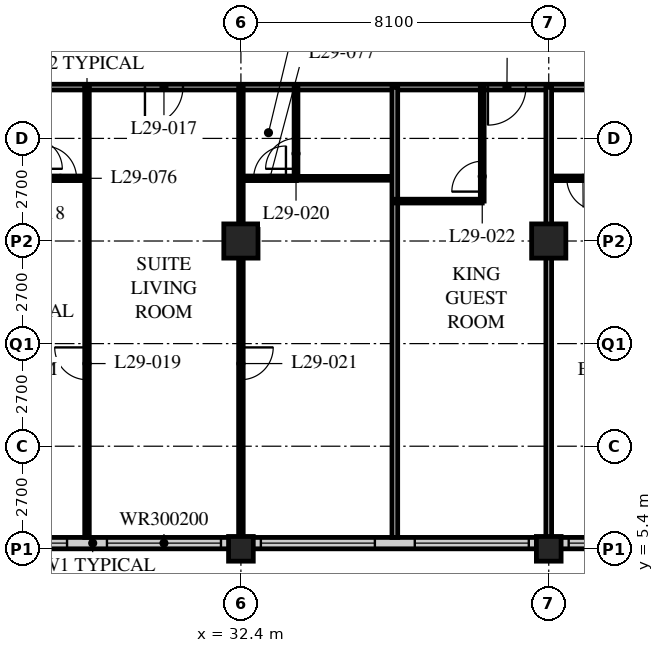
"""IFC4 building model, lengths in metres.
Left out: names, types, materials, properties, quantities, classifications, styles, units other than length and angle.
Written with IfcOpenShell. Run it as: python <this file> out.ifc"""

import sys

from ifc_helpers import new_model, si_unit, direction, frame, frame_2d, origin, origin_2d, place, context, subcontext, project, spatial, rectangle, hollow_rectangle, extrude, element, fill, save


model = new_model("IFC4")
c1 = context("Model", 3, precision=1e-05, world=origin(), true_north=direction((0.0, 1.0)))
c2 = subcontext(c1, "Body", "Model", "MODEL_VIEW")
j1 = project(units=[si_unit("LENGTHUNIT", "METRE"), si_unit("PLANEANGLEUNIT", "RADIAN")], contexts=[c1])
p1 = place(None, origin())
s1 = spatial("IfcSite", under=j1, at=p1, CompositionType="ELEMENT")
p2 = place(p1, origin())
s2 = spatial("IfcBuilding", under=s1, at=p2, CompositionType="ELEMENT")
p3 = place(p2, frame((0.0, 0.0, 117.0)))
s3 = spatial("IfcBuildingStorey", under=s2, at=p3, CompositionType="ELEMENT", Elevation=117.0)
p4 = place(p3, frame((32.4, 5.4, 0.0), z_axis=(0.0, 0.0, 1.0), x_axis=(1.0, 0.0, 0.0)))
e1 = element("IfcColumn", 1, at=p4, inside=s3, PredefinedType="COLUMN", context=c2, shape_type="SweptSolid", body=[
    extrude(hollow_rectangle(XDim=0.65, YDim=0.65, WallThickness=0.055, at=origin_2d()), origin(), (0.0, 0.0, 1.0), 3.4),
])
p5 = place(p3, frame((32.4, 13.5, 0.0), z_axis=(0.0, 0.0, 1.0), x_axis=(1.0, 0.0, 0.0)))
e2 = element("IfcColumn", 2, at=p5, inside=s3, PredefinedType="COLUMN", context=c2, shape_type="SweptSolid", body=[
    extrude(hollow_rectangle(XDim=0.9, YDim=0.9, WallThickness=0.09, at=origin_2d()), origin(), (0.0, 0.0, 1.0), 3.4),
])
p6 = place(p3, frame((40.5, 5.4, 0.0), z_axis=(0.0, 0.0, 1.0), x_axis=(1.0, 0.0, 0.0)))
e3 = element("IfcColumn", 3, at=p6, inside=s3, PredefinedType="COLUMN", context=c2, shape_type="SweptSolid", body=[
    extrude(hollow_rectangle(XDim=0.65, YDim=0.65, WallThickness=0.055, at=origin_2d()), origin(), (0.0, 0.0, 1.0), 3.4),
])
p7 = place(p3, frame((40.5, 13.5, 0.0), z_axis=(0.0, 0.0, 1.0), x_axis=(1.0, 0.0, 0.0)))
e4 = element("IfcColumn", 4, at=p7, inside=s3, PredefinedType="COLUMN", context=c2, shape_type="SweptSolid", body=[
    extrude(hollow_rectangle(XDim=0.9, YDim=0.9, WallThickness=0.09, at=origin_2d()), origin(), (0.0, 0.0, 1.0), 3.4),
])
p8 = place(p3, frame((8.4, 5.55, 0.0), z_axis=(0.0, 0.0, 1.0), x_axis=(1.0, 0.0, 0.0)))
e5 = element("IfcWall", 5, at=p8, inside=s3, PredefinedType="SOLIDWALL", context=c2, shape_type="SweptSolid", body=[
    extrude(rectangle(XDim=40.2, YDim=0.3, at=frame_2d((20.1, 0.0))), origin(), (0.0, 0.0, 1.0), 3.19),
])
p9 = place(p8, frame((0.225, 0.0, 0.9)))
e6 = element("IfcOpeningElement", 6, at=p9, cuts=e5, PredefinedType="OPENING", context=c2, shape_type="SweptSolid", body=[
    extrude(rectangle(XDim=3.0, YDim=2.0, at=frame_2d((1.5, 1.0))), frame((0.0, 0.16, 0.0), z_axis=(0.0, -1.0, 0.0), x_axis=(1.0, 0.0, 0.0)), (0.0, 0.0, 1.0), 0.32),
])
p10 = place(p8, frame((4.275, 0.0, 0.9)))
e7 = element("IfcOpeningElement", 7, at=p10, cuts=e5, PredefinedType="OPENING", context=c2, shape_type="SweptSolid", body=[
    extrude(rectangle(XDim=3.0, YDim=2.0, at=frame_2d((1.5, 1.0))), frame((0.0, 0.16, 0.0), z_axis=(0.0, -1.0, 0.0), x_axis=(1.0, 0.0, 0.0)), (0.0, 0.0, 1.0), 0.32),
])
p11 = place(p8, frame((8.325, 0.0, 0.9)))
e8 = element("IfcOpeningElement", 8, at=p11, cuts=e5, PredefinedType="OPENING", context=c2, shape_type="SweptSolid", body=[
    extrude(rectangle(XDim=3.0, YDim=2.0, at=frame_2d((1.5, 1.0))), frame((0.0, 0.16, 0.0), z_axis=(0.0, -1.0, 0.0), x_axis=(1.0, 0.0, 0.0)), (0.0, 0.0, 1.0), 0.32),
])
p12 = place(p8, frame((12.375, 0.0, 0.9)))
e9 = element("IfcOpeningElement", 9, at=p12, cuts=e5, PredefinedType="OPENING", context=c2, shape_type="SweptSolid", body=[
    extrude(rectangle(XDim=3.0, YDim=2.0, at=frame_2d((1.5, 1.0))), frame((0.0, 0.16, 0.0), z_axis=(0.0, -1.0, 0.0), x_axis=(1.0, 0.0, 0.0)), (0.0, 0.0, 1.0), 0.32),
])
p13 = place(p8, frame((16.425, 0.0, 0.9)))
e10 = element("IfcOpeningElement", 10, at=p13, cuts=e5, PredefinedType="OPENING", context=c2, shape_type="SweptSolid", body=[
    extrude(rectangle(XDim=3.0, YDim=2.0, at=frame_2d((1.5, 1.0))), frame((0.0, 0.16, 0.0), z_axis=(0.0, -1.0, 0.0), x_axis=(1.0, 0.0, 0.0)), (0.0, 0.0, 1.0), 0.32),
])
p14 = place(p8, frame((20.475, 0.0, 0.9)))
e11 = element("IfcOpeningElement", 11, at=p14, cuts=e5, PredefinedType="OPENING", context=c2, shape_type="SweptSolid", body=[
    extrude(rectangle(XDim=3.0, YDim=2.0, at=frame_2d((1.5, 1.0))), frame((0.0, 0.16, 0.0), z_axis=(0.0, -1.0, 0.0), x_axis=(1.0, 0.0, 0.0)), (0.0, 0.0, 1.0), 0.32),
])
p15 = place(p8, frame((24.525, 0.0, 0.9)))
e12 = element("IfcOpeningElement", 12, at=p15, cuts=e5, PredefinedType="OPENING", context=c2, shape_type="SweptSolid", body=[
    extrude(rectangle(XDim=3.0, YDim=2.0, at=frame_2d((1.5, 1.0))), frame((0.0, 0.16, 0.0), z_axis=(0.0, -1.0, 0.0), x_axis=(1.0, 0.0, 0.0)), (0.0, 0.0, 1.0), 0.32),
])
p16 = place(p8, frame((28.575, 0.0, 0.9)))
e13 = element("IfcOpeningElement", 13, at=p16, cuts=e5, PredefinedType="OPENING", context=c2, shape_type="SweptSolid", body=[
    extrude(rectangle(XDim=3.0, YDim=2.0, at=frame_2d((1.5, 1.0))), frame((0.0, 0.16, 0.0), z_axis=(0.0, -1.0, 0.0), x_axis=(1.0, 0.0, 0.0)), (0.0, 0.0, 1.0), 0.32),
])
p17 = place(p8, frame((32.625, 0.0, 0.9)))
e14 = element("IfcOpeningElement", 14, at=p17, cuts=e5, PredefinedType="OPENING", context=c2, shape_type="SweptSolid", body=[
    extrude(rectangle(XDim=3.0, YDim=2.0, at=frame_2d((1.5, 1.0))), frame((0.0, 0.16, 0.0), z_axis=(0.0, -1.0, 0.0), x_axis=(1.0, 0.0, 0.0)), (0.0, 0.0, 1.0), 0.32),
])
p18 = place(p8, frame((36.675, 0.0, 0.9)))
e15 = element("IfcOpeningElement", 15, at=p18, cuts=e5, PredefinedType="OPENING", context=c2, shape_type="SweptSolid", body=[
    extrude(rectangle(XDim=3.0, YDim=2.0, at=frame_2d((1.5, 1.0))), frame((0.0, 0.16, 0.0), z_axis=(0.0, -1.0, 0.0), x_axis=(1.0, 0.0, 0.0)), (0.0, 0.0, 1.0), 0.32),
])
p19 = place(p3, frame((12.15, 17.55, 0.0), z_axis=(0.0, 0.0, 1.0), x_axis=(1.0, 0.0, 0.0)))
e16 = element("IfcWall", 16, at=p19, inside=s3, PredefinedType="PARTITIONING", context=c2, shape_type="SweptSolid", body=[
    extrude(rectangle(XDim=32.4, YDim=0.15, at=frame_2d((16.2, 0.0))), origin(), (0.0, 0.0, 1.0), 3.19),
])
p20 = place(p19, frame((5.95, 0.0, 0.0)))
e17 = element("IfcOpeningElement", 17, at=p20, cuts=e16, PredefinedType="OPENING", context=c2, shape_type="SweptSolid", body=[
    extrude(rectangle(XDim=1.0, YDim=2.1, at=frame_2d((0.5, 1.05))), frame((0.0, 0.085, 0.0), z_axis=(0.0, -1.0, 0.0), x_axis=(1.0, 0.0, 0.0)), (0.0, 0.0, 1.0), 0.17),
])
p21 = place(p19, frame((17.725, 0.0, 0.0)))
e18 = element("IfcOpeningElement", 18, at=p21, cuts=e16, PredefinedType="OPENING", context=c2, shape_type="SweptSolid", body=[
    extrude(rectangle(XDim=1.0, YDim=2.1, at=frame_2d((0.5, 1.05))), frame((0.0, 0.085, 0.0), z_axis=(0.0, -1.0, 0.0), x_axis=(1.0, 0.0, 0.0)), (0.0, 0.0, 1.0), 0.17),
])
p22 = place(p19, frame((26.75, 0.0, 0.0)))
e19 = element("IfcOpeningElement", 19, at=p22, cuts=e16, PredefinedType="OPENING", context=c2, shape_type="SweptSolid", body=[
    extrude(rectangle(XDim=1.0, YDim=2.1, at=frame_2d((0.5, 1.05))), frame((0.0, 0.085, 0.0), z_axis=(0.0, -1.0, 0.0), x_axis=(1.0, 0.0, 0.0)), (0.0, 0.0, 1.0), 0.17),
])
p23 = place(p19, frame((1.525, 0.0, 0.0)))
e20 = element("IfcOpeningElement", 20, at=p23, cuts=e16, PredefinedType="OPENING", context=c2, shape_type="SweptSolid", body=[
    extrude(rectangle(XDim=1.0, YDim=2.1, at=frame_2d((0.5, 1.05))), frame((0.0, 0.085, 0.0), z_axis=(0.0, -1.0, 0.0), x_axis=(1.0, 0.0, 0.0)), (0.0, 0.0, 1.0), 0.17),
])
p24 = place(p19, frame((29.875, 0.0, 0.0)))
e21 = element("IfcOpeningElement", 21, at=p24, cuts=e16, PredefinedType="OPENING", context=c2, shape_type="SweptSolid", body=[
    extrude(rectangle(XDim=1.0, YDim=2.1, at=frame_2d((0.5, 1.05))), frame((0.0, 0.085, 0.0), z_axis=(0.0, -1.0, 0.0), x_axis=(1.0, 0.0, 0.0)), (0.0, 0.0, 1.0), 0.17),
])
p25 = place(p3, frame((28.35, 17.55, 0.0), z_axis=(0.0, 0.0, 1.0), x_axis=(0.0, -1.0, 0.0)))
e22 = element("IfcWall", 22, at=p25, inside=s3, PredefinedType="PARTITIONING", context=c2, shape_type="SweptSolid", body=[
    extrude(rectangle(XDim=11.85, YDim=0.12, at=frame_2d((5.925, 0.0))), origin(), (0.0, 0.0, 1.0), 3.19),
])
p26 = place(p25, frame((6.85, 0.0, 0.0)))
e23 = element("IfcOpeningElement", 23, at=p26, cuts=e22, PredefinedType="OPENING", context=c2, shape_type="SweptSolid", body=[
    extrude(rectangle(XDim=0.85, YDim=2.1, at=frame_2d((0.425, 1.05))), frame((0.0, 0.07, 0.0), z_axis=(0.0, -1.0, 0.0), x_axis=(1.0, 0.0, 0.0)), (0.0, 0.0, 1.0), 0.14),
])
p27 = place(p3, frame((33.85, 15.15, 0.0), z_axis=(0.0, 0.0, 1.0), x_axis=(1.0, 0.0, 0.0)))
e24 = element("IfcWall", 24, at=p27, inside=s3, PredefinedType="PARTITIONING", context=c2, shape_type="SweptSolid", body=[
    extrude(rectangle(XDim=2.6, YDim=0.1, at=frame_2d((1.3, 0.0))), origin(), (0.0, 0.0, 1.0), 3.19),
])
p28 = place(p3, frame((33.85, 17.55, 0.0), z_axis=(0.0, 0.0, 1.0), x_axis=(0.0, -1.0, 0.0)))
e25 = element("IfcWall", 25, at=p28, inside=s3, PredefinedType="PARTITIONING", context=c2, shape_type="SweptSolid", body=[
    extrude(rectangle(XDim=2.4, YDim=0.1, at=frame_2d((1.2, 0.0))), origin(), (0.0, 0.0, 1.0), 3.19),
])
p29 = place(p28, frame((1.35, 0.0, 0.0)))
e26 = element("IfcOpeningElement", 26, at=p29, cuts=e25, PredefinedType="OPENING", context=c2, shape_type="SweptSolid", body=[
    extrude(rectangle(XDim=0.8, YDim=2.1, at=frame_2d((0.4, 1.05))), frame((0.0, 0.06, 0.0), z_axis=(0.0, -1.0, 0.0), x_axis=(1.0, 0.0, 0.0)), (0.0, 0.0, 1.0), 0.12),
])
p30 = place(p3, frame((32.4, 17.55, 0.0), z_axis=(0.0, 0.0, 1.0), x_axis=(0.0, -1.0, 0.0)))
e27 = element("IfcWall", 27, at=p30, inside=s3, PredefinedType="PARTITIONING", context=c2, shape_type="SweptSolid", body=[
    extrude(rectangle(XDim=11.85, YDim=0.12, at=frame_2d((5.925, 0.0))), origin(), (0.0, 0.0, 1.0), 2.578),
])
p31 = place(p30, frame((6.85, 0.0, 0.0)))
e28 = element("IfcOpeningElement", 28, at=p31, cuts=e27, PredefinedType="OPENING", context=c2, shape_type="SweptSolid", body=[
    extrude(rectangle(XDim=0.85, YDim=2.1, at=frame_2d((0.425, 1.05))), frame((0.0, 0.07, 0.0), z_axis=(0.0, -1.0, 0.0), x_axis=(1.0, 0.0, 0.0)), (0.0, 0.0, 1.0), 0.14),
])
p32 = place(p3, frame((36.45, 17.55, 0.0), z_axis=(0.0, 0.0, 1.0), x_axis=(0.0, -1.0, 0.0)))
e29 = element("IfcWall", 29, at=p32, inside=s3, PredefinedType="PARTITIONING", context=c2, shape_type="SweptSolid", body=[
    extrude(rectangle(XDim=11.85, YDim=0.15, at=frame_2d((5.925, 0.0))), origin(), (0.0, 0.0, 1.0), 3.19),
])
p33 = place(p3, frame((36.45, 14.55, 0.0), z_axis=(0.0, 0.0, 1.0), x_axis=(1.0, 0.0, 0.0)))
e30 = element("IfcWall", 30, at=p33, inside=s3, PredefinedType="PARTITIONING", context=c2, shape_type="SweptSolid", body=[
    extrude(rectangle(XDim=2.3, YDim=0.1, at=frame_2d((1.15, 0.0))), origin(), (0.0, 0.0, 1.0), 3.19),
])
p34 = place(p3, frame((38.75, 17.55, 0.0), z_axis=(0.0, 0.0, 1.0), x_axis=(0.0, -1.0, 0.0)))
e31 = element("IfcWall", 31, at=p34, inside=s3, PredefinedType="PARTITIONING", context=c2, shape_type="SweptSolid", body=[
    extrude(rectangle(XDim=3.0, YDim=0.1, at=frame_2d((1.5, 0.0))), origin(), (0.0, 0.0, 1.0), 3.19),
])
p35 = place(p34, frame((1.95, 0.0, 0.0)))
e32 = element("IfcOpeningElement", 32, at=p35, cuts=e31, PredefinedType="OPENING", context=c2, shape_type="SweptSolid", body=[
    extrude(rectangle(XDim=0.8, YDim=2.1, at=frame_2d((0.4, 1.05))), frame((0.0, 0.06, 0.0), z_axis=(0.0, -1.0, 0.0), x_axis=(1.0, 0.0, 0.0)), (0.0, 0.0, 1.0), 0.12),
])
p36 = place(p3, frame((40.5, 15.15, 0.0), z_axis=(0.0, 0.0, 1.0), x_axis=(1.0, 0.0, 0.0)))
e33 = element("IfcWall", 33, at=p36, inside=s3, PredefinedType="PARTITIONING", context=c2, shape_type="SweptSolid", body=[
    extrude(rectangle(XDim=8.05, YDim=0.12, at=frame_2d((4.025, 0.0))), origin(), (0.0, 0.0, 1.0), 3.19),
])
p37 = place(p36, frame((0.475, 0.0, 0.0)))
e34 = element("IfcOpeningElement", 34, at=p37, cuts=e33, PredefinedType="OPENING", context=c2, shape_type="SweptSolid", body=[
    extrude(rectangle(XDim=0.85, YDim=2.1, at=frame_2d((0.425, 1.05))), frame((0.0, 0.07, 0.0), z_axis=(0.0, -1.0, 0.0), x_axis=(1.0, 0.0, 0.0)), (0.0, 0.0, 1.0), 0.14),
])
p38 = place(p36, frame((4.325, 0.0, 0.0)))
e35 = element("IfcOpeningElement", 35, at=p38, cuts=e33, PredefinedType="OPENING", context=c2, shape_type="SweptSolid", body=[
    extrude(rectangle(XDim=0.85, YDim=2.1, at=frame_2d((0.425, 1.05))), frame((0.0, 0.07, 0.0), z_axis=(0.0, -1.0, 0.0), x_axis=(1.0, 0.0, 0.0)), (0.0, 0.0, 1.0), 0.14),
])
p39 = place(p3, frame((40.5, 17.55, 0.0), z_axis=(0.0, 0.0, 1.0), x_axis=(0.0, -1.0, 0.0)))
e36 = element("IfcWall", 36, at=p39, inside=s3, PredefinedType="PARTITIONING", context=c2, shape_type="SweptSolid", body=[
    extrude(rectangle(XDim=11.85, YDim=0.15, at=frame_2d((5.925, 0.0))), origin(), (0.0, 0.0, 1.0), 2.578),
])
p40 = place(p3, frame((28.35, 15.15, 0.0), z_axis=(0.0, 0.0, 1.0), x_axis=(-1.0, 0.0, 0.0)))
e37 = element("IfcWall", 37, at=p40, inside=s3, PredefinedType="PARTITIONING", context=c2, shape_type="SweptSolid", body=[
    extrude(rectangle(XDim=1.46, YDim=0.12, at=frame_2d((0.73, 0.0))), origin(), (0.0, 0.0, 1.0), 3.19),
])
p41 = place(p40, frame((0.275, 0.0, 0.0)))
e38 = element("IfcOpeningElement", 38, at=p41, cuts=e37, PredefinedType="OPENING", context=c2, shape_type="SweptSolid", body=[
    extrude(rectangle(XDim=0.85, YDim=2.1, at=frame_2d((0.425, 1.05))), frame((0.0, 0.07, 0.0), z_axis=(0.0, -1.0, 0.0), x_axis=(1.0, 0.0, 0.0)), (0.0, 0.0, 1.0), 0.14),
])
p42 = place(p3, frame((33.86, 15.15, 0.0), z_axis=(0.0, 0.0, 1.0), x_axis=(-1.0, 0.0, 0.0)))
e39 = element("IfcWall", 39, at=p42, inside=s3, PredefinedType="PARTITIONING", context=c2, shape_type="SweptSolid", body=[
    extrude(rectangle(XDim=1.46, YDim=0.12, at=frame_2d((0.73, 0.0))), origin(), (0.0, 0.0, 1.0), 3.19),
])
p43 = place(p42, frame((0.275, 0.0, 0.0)))
e40 = element("IfcOpeningElement", 40, at=p43, cuts=e39, PredefinedType="OPENING", context=c2, shape_type="SweptSolid", body=[
    extrude(rectangle(XDim=0.85, YDim=2.1, at=frame_2d((0.425, 1.05))), frame((0.0, 0.07, 0.0), z_axis=(0.0, -1.0, 0.0), x_axis=(1.0, 0.0, 0.0)), (0.0, 0.0, 1.0), 0.14),
])
p44 = place(p13, origin())
e41 = element("IfcWindow", 41, at=p44, inside=s3, PartitioningType="SINGLE_PANEL", PredefinedType="WINDOW", context=c2, shape_type="SweptSolid", body=[
    extrude(rectangle(XDim=3.0, YDim=2.0, at=frame_2d((1.5, 1.0))), frame((0.0, 0.03, 0.0), z_axis=(0.0, -1.0, 0.0), x_axis=(1.0, 0.0, 0.0)), (0.0, 0.0, 1.0), 0.06),
])
fill(e10, e41)
p45 = place(p14, origin())
e42 = element("IfcWindow", 42, at=p45, inside=s3, PartitioningType="SINGLE_PANEL", PredefinedType="WINDOW", context=c2, shape_type="SweptSolid", body=[
    extrude(rectangle(XDim=3.0, YDim=2.0, at=frame_2d((1.5, 1.0))), frame((0.0, 0.03, 0.0), z_axis=(0.0, -1.0, 0.0), x_axis=(1.0, 0.0, 0.0)), (0.0, 0.0, 1.0), 0.06),
])
fill(e11, e42)
p46 = place(p15, origin())
e43 = element("IfcWindow", 43, at=p46, inside=s3, PartitioningType="SINGLE_PANEL", PredefinedType="WINDOW", context=c2, shape_type="SweptSolid", body=[
    extrude(rectangle(XDim=3.0, YDim=2.0, at=frame_2d((1.5, 1.0))), frame((0.0, 0.03, 0.0), z_axis=(0.0, -1.0, 0.0), x_axis=(1.0, 0.0, 0.0)), (0.0, 0.0, 1.0), 0.06),
])
fill(e12, e43)
p47 = place(p16, origin())
e44 = element("IfcWindow", 44, at=p47, inside=s3, PartitioningType="SINGLE_PANEL", PredefinedType="WINDOW", context=c2, shape_type="SweptSolid", body=[
    extrude(rectangle(XDim=3.0, YDim=2.0, at=frame_2d((1.5, 1.0))), frame((0.0, 0.03, 0.0), z_axis=(0.0, -1.0, 0.0), x_axis=(1.0, 0.0, 0.0)), (0.0, 0.0, 1.0), 0.06),
])
fill(e13, e44)
p48 = place(p17, origin())
e45 = element("IfcWindow", 45, at=p48, inside=s3, PartitioningType="SINGLE_PANEL", PredefinedType="WINDOW", context=c2, shape_type="SweptSolid", body=[
    extrude(rectangle(XDim=3.0, YDim=2.0, at=frame_2d((1.5, 1.0))), frame((0.0, 0.03, 0.0), z_axis=(0.0, -1.0, 0.0), x_axis=(1.0, 0.0, 0.0)), (0.0, 0.0, 1.0), 0.06),
])
fill(e14, e45)
p49 = place(p21, origin())
e46 = element("IfcDoor", 46, at=p49, inside=s3, OperationType="SINGLE_SWING_RIGHT", PredefinedType="DOOR", context=c2, shape_type="SweptSolid", body=[
    extrude(rectangle(XDim=1.0, YDim=2.1, at=frame_2d((0.5, 1.05))), frame((0.0, 0.025, 0.0), z_axis=(0.0, -1.0, 0.0), x_axis=(1.0, 0.0, 0.0)), (0.0, 0.0, 1.0), 0.05),
])
fill(e18, e46)
p50 = place(p26, origin())
e47 = element("IfcDoor", 47, at=p50, inside=s3, OperationType="SINGLE_SWING_RIGHT", PredefinedType="DOOR", context=c2, shape_type="SweptSolid", body=[
    extrude(rectangle(XDim=0.85, YDim=2.1, at=frame_2d((0.425, 1.05))), frame((0.0, 0.025, 0.0), z_axis=(0.0, -1.0, 0.0), x_axis=(1.0, 0.0, 0.0)), (0.0, 0.0, 1.0), 0.05),
])
fill(e23, e47)
p51 = place(p29, origin())
e48 = element("IfcDoor", 48, at=p51, inside=s3, OperationType="SINGLE_SWING_LEFT", PredefinedType="DOOR", context=c2, shape_type="SweptSolid", body=[
    extrude(rectangle(XDim=0.8, YDim=2.1, at=frame_2d((0.4, 1.05))), frame((0.0, 0.025, 0.0), z_axis=(0.0, -1.0, 0.0), x_axis=(1.0, 0.0, 0.0)), (0.0, 0.0, 1.0), 0.05),
])
fill(e26, e48)
p52 = place(p31, origin())
e49 = element("IfcDoor", 49, at=p52, inside=s3, OperationType="SINGLE_SWING_LEFT", PredefinedType="DOOR", context=c2, shape_type="SweptSolid", body=[
    extrude(rectangle(XDim=0.85, YDim=2.1, at=frame_2d((0.425, 1.05))), frame((0.0, 0.025, 0.0), z_axis=(0.0, -1.0, 0.0), x_axis=(1.0, 0.0, 0.0)), (0.0, 0.0, 1.0), 0.05),
])
fill(e28, e49)
p53 = place(p35, origin())
e50 = element("IfcDoor", 50, at=p53, inside=s3, OperationType="SINGLE_SWING_LEFT", PredefinedType="DOOR", context=c2, shape_type="SweptSolid", body=[
    extrude(rectangle(XDim=0.8, YDim=2.1, at=frame_2d((0.4, 1.05))), frame((0.0, 0.025, 0.0), z_axis=(0.0, -1.0, 0.0), x_axis=(1.0, 0.0, 0.0)), (0.0, 0.0, 1.0), 0.05),
])
fill(e32, e50)
p54 = place(p22, origin())
e51 = element("IfcDoor", 51, at=p54, inside=s3, OperationType="SINGLE_SWING_RIGHT", PredefinedType="DOOR", context=c2, shape_type="SweptSolid", body=[
    extrude(rectangle(XDim=1.0, YDim=2.1, at=frame_2d((0.5, 1.05))), frame((0.0, 0.025, 0.0), z_axis=(0.0, -1.0, 0.0), x_axis=(1.0, 0.0, 0.0)), (0.0, 0.0, 1.0), 0.05),
])
fill(e19, e51)
p55 = place(p37, origin())
e52 = element("IfcDoor", 52, at=p55, inside=s3, OperationType="SINGLE_SWING_LEFT", PredefinedType="DOOR", context=c2, shape_type="SweptSolid", body=[
    extrude(rectangle(XDim=0.85, YDim=2.1, at=frame_2d((0.425, 1.05))), frame((0.0, 0.025, 0.0), z_axis=(0.0, -1.0, 0.0), x_axis=(1.0, 0.0, 0.0)), (0.0, 0.0, 1.0), 0.05),
])
fill(e34, e52)
p56 = place(p41, origin())
e53 = element("IfcDoor", 53, at=p56, inside=s3, OperationType="SINGLE_SWING_LEFT", PredefinedType="DOOR", context=c2, shape_type="SweptSolid", body=[
    extrude(rectangle(XDim=0.85, YDim=2.1, at=frame_2d((0.425, 1.05))), frame((0.0, 0.025, 0.0), z_axis=(0.0, -1.0, 0.0), x_axis=(1.0, 0.0, 0.0)), (0.0, 0.0, 1.0), 0.05),
])
fill(e38, e53)
p57 = place(p43, origin())
e54 = element("IfcDoor", 54, at=p57, inside=s3, OperationType="SINGLE_SWING_RIGHT", PredefinedType="DOOR", context=c2, shape_type="SweptSolid", body=[
    extrude(rectangle(XDim=0.85, YDim=2.1, at=frame_2d((0.425, 1.05))), frame((0.0, 0.025, 0.0), z_axis=(0.0, -1.0, 0.0), x_axis=(1.0, 0.0, 0.0)), (0.0, 0.0, 1.0), 0.05),
])
fill(e40, e54)
save(model, sys.argv[1])
